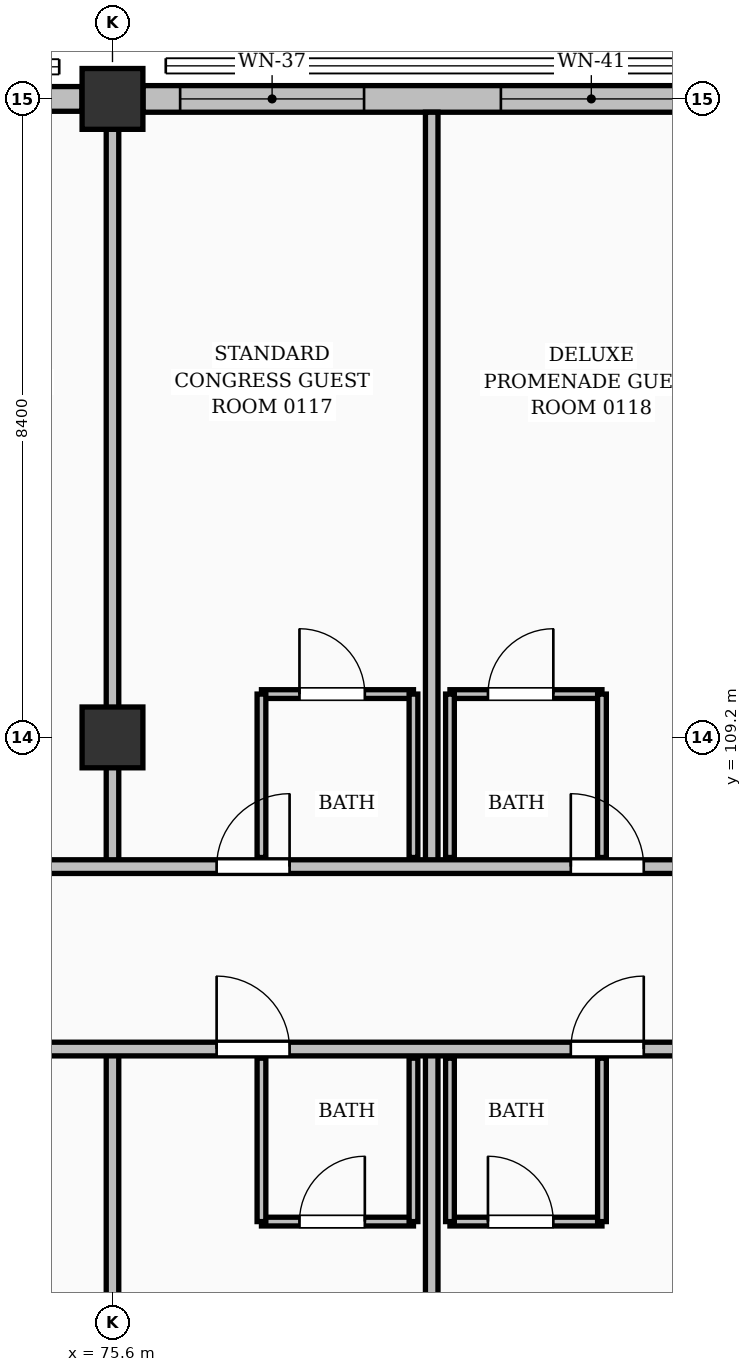
"""IFC4 building model, lengths in metres.
Left out: names, types, materials, properties, quantities, classifications, styles, units other than length and angle.
Written with IfcOpenShell. Run it as: python <this file> out.ifc"""

import sys

from ifc_helpers import new_model, si_unit, direction, frame, frame_2d, origin, origin_2d, place, context, subcontext, project, spatial, rectangle, extrude, element, fill, save


model = new_model("IFC4")
c1 = context("Model", 3, precision=1e-05, world=origin(), true_north=direction((0.0, 1.0)))
c2 = subcontext(c1, "Body", "Model", "MODEL_VIEW")
j1 = project(units=[si_unit("LENGTHUNIT", "METRE"), si_unit("PLANEANGLEUNIT", "RADIAN")], contexts=[c1])
p1 = place(None, origin())
s1 = spatial("IfcSite", under=j1, at=p1, CompositionType="ELEMENT")
p2 = place(p1, origin())
s2 = spatial("IfcBuilding", under=s1, at=p2, CompositionType="ELEMENT")
p3 = place(p2, frame((0.0, 0.0, 3.92)))
s3 = spatial("IfcBuildingStorey", under=s2, at=p3, CompositionType="ELEMENT", Elevation=3.92)
for number, where, z_axis, x_axis in (
    (1, (75.6, 109.2, 0.0), (0.0, 0.0, 1.0), (1.0, 0.0, 0.0)),
    (2, (75.6, 117.6, 0.0), (0.0, 0.0, 1.0), (1.0, 0.0, 0.0)),
):
    element("IfcColumn", number, at=place(p3, frame(where, z_axis=z_axis, x_axis=x_axis)), inside=s3, PredefinedType="COLUMN", context=c2, shape_type="SweptSolid", body=[
        extrude(rectangle(XDim=0.8, YDim=0.8, at=origin_2d()), origin(), (0.0, 0.0, 1.0), 3.64),
    ])
p4 = place(p3, frame((67.601, 117.6, 0.0), z_axis=(0.0, 0.0, 1.0), x_axis=(1.0, 0.0, 0.0)))
e3 = element("IfcWall", 3, at=p4, inside=s3, PredefinedType="SOLIDWALL", context=c2, shape_type="SweptSolid", body=[
    extrude(rectangle(XDim=7.598, YDim=0.325, at=frame_2d((3.799, 0.0))), origin(), (0.0, 0.0, 1.0), 2.445),
])
p5 = place(p4, frame((0.589, 0.0, 0.25)))
e4 = element("IfcOpeningElement", 4, at=p5, cuts=e3, PredefinedType="OPENING", context=c2, shape_type="SweptSolid", body=[
    extrude(rectangle(XDim=2.22, YDim=1.9, at=frame_2d((1.11, 0.95))), frame((0.0, 0.172, 0.0), z_axis=(0.0, -1.0, 0.0), x_axis=(1.0, 0.0, 0.0)), (0.0, 0.0, 1.0), 0.345),
])
p6 = place(p4, frame((4.689, 0.0, 0.25)))
e5 = element("IfcOpeningElement", 5, at=p6, cuts=e3, PredefinedType="OPENING", context=c2, shape_type="SweptSolid", body=[
    extrude(rectangle(XDim=2.42, YDim=1.9, at=frame_2d((1.21, 0.95))), frame((0.0, 0.172, 0.0), z_axis=(0.0, -1.0, 0.0), x_axis=(1.0, 0.0, 0.0)), (0.0, 0.0, 1.0), 0.345),
])
p7 = place(p3, frame((76.001, 117.6, 0.0), z_axis=(0.0, 0.0, 1.0), x_axis=(1.0, 0.0, 0.0)))
e6 = element("IfcWall", 6, at=p7, inside=s3, PredefinedType="SOLIDWALL", context=c2, shape_type="SweptSolid", body=[
    extrude(rectangle(XDim=7.548, YDim=0.35, at=frame_2d((3.774, 0.0))), origin(), (0.0, 0.0, 1.0), 2.445),
])
p8 = place(p7, frame((0.489, 0.0, 0.25)))
e7 = element("IfcOpeningElement", 7, at=p8, cuts=e6, PredefinedType="OPENING", context=c2, shape_type="SweptSolid", body=[
    extrude(rectangle(XDim=2.42, YDim=1.9, at=frame_2d((1.21, 0.95))), frame((0.0, 0.185, 0.0), z_axis=(0.0, -1.0, 0.0), x_axis=(1.0, 0.0, 0.0)), (0.0, 0.0, 1.0), 0.37),
])
p9 = place(p7, frame((4.709, 0.0, 0.25)))
e8 = element("IfcOpeningElement", 8, at=p9, cuts=e6, PredefinedType="OPENING", context=c2, shape_type="SweptSolid", body=[
    extrude(rectangle(XDim=2.38, YDim=2.0, at=frame_2d((1.19, 1.0))), frame((0.0, 0.185, 0.0), z_axis=(0.0, -1.0, 0.0), x_axis=(1.0, 0.0, 0.0)), (0.0, 0.0, 1.0), 0.37),
])
p10 = place(p3, frame((77.56, 109.77, 0.0), z_axis=(0.0, 0.0, 1.0), x_axis=(1.0, 0.0, 0.0)))
e9 = element("IfcWall", 9, at=p10, inside=s3, PredefinedType="PARTITIONING", context=c2, shape_type="SweptSolid", body=[
    extrude(rectangle(XDim=2.0, YDim=0.115, at=frame_2d((1.0, 0.0))), origin(), (0.0, 0.0, 1.0), 3.36),
])
p11 = place(p10, frame((0.5, 0.0, 0.0)))
e10 = element("IfcOpeningElement", 10, at=p11, cuts=e9, PredefinedType="OPENING", context=c2, shape_type="SweptSolid", body=[
    extrude(rectangle(XDim=0.86, YDim=2.05, at=frame_2d((0.43, 1.025))), frame((0.0, 0.067, 0.0), z_axis=(0.0, -1.0, 0.0), x_axis=(1.0, 0.0, 0.0)), (0.0, 0.0, 1.0), 0.135),
])
p12 = place(p3, frame((77.56, 107.62, 0.0), z_axis=(0.0, 0.0, 1.0), x_axis=(0.0, 1.0, 0.0)))
e11 = element("IfcWall", 11, at=p12, inside=s3, PredefinedType="PARTITIONING", context=c2, shape_type="SweptSolid", body=[
    extrude(rectangle(XDim=2.15, YDim=0.115, at=frame_2d((1.075, 0.0))), origin(), (0.0, 0.0, 1.0), 2.882),
])
p13 = place(p3, frame((79.56, 107.62, 0.0), z_axis=(0.0, 0.0, 1.0), x_axis=(0.0, 1.0, 0.0)))
e12 = element("IfcWall", 12, at=p13, inside=s3, PredefinedType="PARTITIONING", context=c2, shape_type="SweptSolid", body=[
    extrude(rectangle(XDim=2.15, YDim=0.115, at=frame_2d((1.075, 0.0))), origin(), (0.0, 0.0, 1.0), 3.36),
])
p14 = place(p3, frame((80.04, 109.77, 0.0), z_axis=(0.0, 0.0, 1.0), x_axis=(1.0, 0.0, 0.0)))
e13 = element("IfcWall", 13, at=p14, inside=s3, PredefinedType="PARTITIONING", context=c2, shape_type="SweptSolid", body=[
    extrude(rectangle(XDim=2.0, YDim=0.115, at=frame_2d((1.0, 0.0))), origin(), (0.0, 0.0, 1.0), 3.36),
])
p15 = place(p14, frame((0.5, 0.0, 0.0)))
e14 = element("IfcOpeningElement", 14, at=p15, cuts=e13, PredefinedType="OPENING", context=c2, shape_type="SweptSolid", body=[
    extrude(rectangle(XDim=0.86, YDim=2.05, at=frame_2d((0.43, 1.025))), frame((0.0, 0.067, 0.0), z_axis=(0.0, -1.0, 0.0), x_axis=(1.0, 0.0, 0.0)), (0.0, 0.0, 1.0), 0.135),
])
p16 = place(p3, frame((80.04, 107.62, 0.0), z_axis=(0.0, 0.0, 1.0), x_axis=(0.0, 1.0, 0.0)))
e15 = element("IfcWall", 15, at=p16, inside=s3, PredefinedType="PARTITIONING", context=c2, shape_type="SweptSolid", body=[
    extrude(rectangle(XDim=2.15, YDim=0.115, at=frame_2d((1.075, 0.0))), origin(), (0.0, 0.0, 1.0), 3.36),
])
p17 = place(p3, frame((82.04, 107.62, 0.0), z_axis=(0.0, 0.0, 1.0), x_axis=(0.0, 1.0, 0.0)))
e16 = element("IfcWall", 16, at=p17, inside=s3, PredefinedType="PARTITIONING", context=c2, shape_type="SweptSolid", body=[
    extrude(rectangle(XDim=2.15, YDim=0.115, at=frame_2d((1.075, 0.0))), origin(), (0.0, 0.0, 1.0), 2.882),
])
p18 = place(p3, frame((79.8, 107.5, 0.0), z_axis=(0.0, 0.0, 1.0), x_axis=(0.0, 1.0, 0.0)))
e17 = element("IfcWall", 17, at=p18, inside=s3, PredefinedType="PARTITIONING", context=c2, shape_type="SweptSolid", body=[
    extrude(rectangle(XDim=9.925, YDim=0.165, at=frame_2d((4.962, 0.0))), origin(), (0.0, 0.0, 1.0), 3.36),
])
p19 = place(p3, frame((75.6, 107.5, 0.0), z_axis=(0.0, 0.0, 1.0), x_axis=(0.0, 1.0, 0.0)))
e18 = element("IfcWall", 18, at=p19, inside=s3, PredefinedType="PARTITIONING", context=c2, shape_type="SweptSolid", body=[
    extrude(rectangle(XDim=9.75, YDim=0.165, at=frame_2d((4.875, 0.0))), origin(), (0.0, 0.0, 1.0), 2.495),
])
p20 = place(p3, frame((40.66, 107.5, 0.0), z_axis=(0.0, 0.0, 1.0), x_axis=(1.0, 0.0, 0.0)))
e19 = element("IfcWall", 19, at=p20, inside=s3, PredefinedType="PARTITIONING", context=c2, shape_type="SweptSolid", body=[
    extrude(rectangle(XDim=43.15, YDim=0.18, at=frame_2d((21.575, 0.0))), origin(), (0.0, 0.0, 1.0), 3.36),
])
p21 = place(p20, frame((0.2, 0.0, 0.0)))
e20 = element("IfcOpeningElement", 20, at=p21, cuts=e19, PredefinedType="OPENING", context=c2, shape_type="SweptSolid", body=[
    extrude(rectangle(XDim=0.94, YDim=2.1, at=frame_2d((0.47, 1.05))), frame((0.0, 0.1, 0.0), z_axis=(0.0, -1.0, 0.0), x_axis=(1.0, 0.0, 0.0)), (0.0, 0.0, 1.0), 0.2),
])
p22 = place(p20, frame((2.71, 0.0, 0.0)))
e21 = element("IfcOpeningElement", 21, at=p22, cuts=e19, PredefinedType="OPENING", context=c2, shape_type="SweptSolid", body=[
    extrude(rectangle(XDim=0.96, YDim=2.15, at=frame_2d((0.48, 1.075))), frame((0.0, 0.1, 0.0), z_axis=(0.0, -1.0, 0.0), x_axis=(1.0, 0.0, 0.0)), (0.0, 0.0, 1.0), 0.2),
])
p23 = place(p20, frame((7.37, 0.0, 0.0)))
e22 = element("IfcOpeningElement", 22, at=p23, cuts=e19, PredefinedType="OPENING", context=c2, shape_type="SweptSolid", body=[
    extrude(rectangle(XDim=0.96, YDim=2.15, at=frame_2d((0.48, 1.075))), frame((0.0, 0.1, 0.0), z_axis=(0.0, -1.0, 0.0), x_axis=(1.0, 0.0, 0.0)), (0.0, 0.0, 1.0), 0.2),
])
p24 = place(p20, frame((11.11, 0.0, 0.0)))
e23 = element("IfcOpeningElement", 23, at=p24, cuts=e19, PredefinedType="OPENING", context=c2, shape_type="SweptSolid", body=[
    extrude(rectangle(XDim=0.96, YDim=2.15, at=frame_2d((0.48, 1.075))), frame((0.0, 0.1, 0.0), z_axis=(0.0, -1.0, 0.0), x_axis=(1.0, 0.0, 0.0)), (0.0, 0.0, 1.0), 0.2),
])
p25 = place(p20, frame((15.77, 0.0, 0.0)))
e24 = element("IfcOpeningElement", 24, at=p25, cuts=e19, PredefinedType="OPENING", context=c2, shape_type="SweptSolid", body=[
    extrude(rectangle(XDim=0.96, YDim=2.15, at=frame_2d((0.48, 1.075))), frame((0.0, 0.1, 0.0), z_axis=(0.0, -1.0, 0.0), x_axis=(1.0, 0.0, 0.0)), (0.0, 0.0, 1.0), 0.2),
])
p26 = place(p20, frame((19.51, 0.0, 0.0)))
e25 = element("IfcOpeningElement", 25, at=p26, cuts=e19, PredefinedType="OPENING", context=c2, shape_type="SweptSolid", body=[
    extrude(rectangle(XDim=0.96, YDim=2.15, at=frame_2d((0.48, 1.075))), frame((0.0, 0.1, 0.0), z_axis=(0.0, -1.0, 0.0), x_axis=(1.0, 0.0, 0.0)), (0.0, 0.0, 1.0), 0.2),
])
p27 = place(p20, frame((24.17, 0.0, 0.0)))
e26 = element("IfcOpeningElement", 26, at=p27, cuts=e19, PredefinedType="OPENING", context=c2, shape_type="SweptSolid", body=[
    extrude(rectangle(XDim=0.96, YDim=2.15, at=frame_2d((0.48, 1.075))), frame((0.0, 0.1, 0.0), z_axis=(0.0, -1.0, 0.0), x_axis=(1.0, 0.0, 0.0)), (0.0, 0.0, 1.0), 0.2),
])
p28 = place(p20, frame((27.91, 0.0, 0.0)))
e27 = element("IfcOpeningElement", 27, at=p28, cuts=e19, PredefinedType="OPENING", context=c2, shape_type="SweptSolid", body=[
    extrude(rectangle(XDim=0.96, YDim=2.15, at=frame_2d((0.48, 1.075))), frame((0.0, 0.1, 0.0), z_axis=(0.0, -1.0, 0.0), x_axis=(1.0, 0.0, 0.0)), (0.0, 0.0, 1.0), 0.2),
])
p29 = place(p20, frame((32.57, 0.0, 0.0)))
e28 = element("IfcOpeningElement", 28, at=p29, cuts=e19, PredefinedType="OPENING", context=c2, shape_type="SweptSolid", body=[
    extrude(rectangle(XDim=0.96, YDim=2.15, at=frame_2d((0.48, 1.075))), frame((0.0, 0.1, 0.0), z_axis=(0.0, -1.0, 0.0), x_axis=(1.0, 0.0, 0.0)), (0.0, 0.0, 1.0), 0.2),
])
p30 = place(p20, frame((36.31, 0.0, 0.0)))
e29 = element("IfcOpeningElement", 29, at=p30, cuts=e19, PredefinedType="OPENING", context=c2, shape_type="SweptSolid", body=[
    extrude(rectangle(XDim=0.96, YDim=2.15, at=frame_2d((0.48, 1.075))), frame((0.0, 0.1, 0.0), z_axis=(0.0, -1.0, 0.0), x_axis=(1.0, 0.0, 0.0)), (0.0, 0.0, 1.0), 0.2),
])
p31 = place(p20, frame((40.97, 0.0, 0.0)))
e30 = element("IfcOpeningElement", 30, at=p31, cuts=e19, PredefinedType="OPENING", context=c2, shape_type="SweptSolid", body=[
    extrude(rectangle(XDim=0.96, YDim=2.15, at=frame_2d((0.48, 1.075))), frame((0.0, 0.1, 0.0), z_axis=(0.0, -1.0, 0.0), x_axis=(1.0, 0.0, 0.0)), (0.0, 0.0, 1.0), 0.2),
])
p32 = place(p3, frame((77.56, 102.83, 0.0), z_axis=(0.0, 0.0, 1.0), x_axis=(1.0, 0.0, 0.0)))
e31 = element("IfcWall", 31, at=p32, inside=s3, PredefinedType="PARTITIONING", context=c2, shape_type="SweptSolid", body=[
    extrude(rectangle(XDim=2.0, YDim=0.115, at=frame_2d((1.0, 0.0))), origin(), (0.0, 0.0, 1.0), 3.36),
])
p33 = place(p32, frame((0.5, 0.0, 0.0)))
e32 = element("IfcOpeningElement", 32, at=p33, cuts=e31, PredefinedType="OPENING", context=c2, shape_type="SweptSolid", body=[
    extrude(rectangle(XDim=0.86, YDim=2.05, at=frame_2d((0.43, 1.025))), frame((0.0, 0.067, 0.0), z_axis=(0.0, -1.0, 0.0), x_axis=(1.0, 0.0, 0.0)), (0.0, 0.0, 1.0), 0.135),
])
for number, where, z_axis, x_axis in (
    (33, (77.56, 102.83, 0.0), (0.0, 0.0, 1.0), (0.0, 1.0, 0.0)),
    (34, (79.56, 102.83, 0.0), (0.0, 0.0, 1.0), (0.0, 1.0, 0.0)),
):
    element("IfcWall", number, at=place(p3, frame(where, z_axis=z_axis, x_axis=x_axis)), inside=s3, PredefinedType="PARTITIONING", context=c2, shape_type="SweptSolid", body=[
        extrude(rectangle(XDim=2.15, YDim=0.115, at=frame_2d((1.075, 0.0))), origin(), (0.0, 0.0, 1.0), 3.36),
    ])
p34 = place(p3, frame((80.04, 102.83, 0.0), z_axis=(0.0, 0.0, 1.0), x_axis=(1.0, 0.0, 0.0)))
e35 = element("IfcWall", 35, at=p34, inside=s3, PredefinedType="PARTITIONING", context=c2, shape_type="SweptSolid", body=[
    extrude(rectangle(XDim=2.0, YDim=0.115, at=frame_2d((1.0, 0.0))), origin(), (0.0, 0.0, 1.0), 3.36),
])
p35 = place(p34, frame((0.5, 0.0, 0.0)))
e36 = element("IfcOpeningElement", 36, at=p35, cuts=e35, PredefinedType="OPENING", context=c2, shape_type="SweptSolid", body=[
    extrude(rectangle(XDim=0.86, YDim=2.05, at=frame_2d((0.43, 1.025))), frame((0.0, 0.067, 0.0), z_axis=(0.0, -1.0, 0.0), x_axis=(1.0, 0.0, 0.0)), (0.0, 0.0, 1.0), 0.135),
])
for number, where, z_axis, x_axis in (
    (37, (80.04, 102.83, 0.0), (0.0, 0.0, 1.0), (0.0, 1.0, 0.0)),
    (38, (82.04, 102.83, 0.0), (0.0, 0.0, 1.0), (0.0, 1.0, 0.0)),
):
    element("IfcWall", number, at=place(p3, frame(where, z_axis=z_axis, x_axis=x_axis)), inside=s3, PredefinedType="PARTITIONING", context=c2, shape_type="SweptSolid", body=[
        extrude(rectangle(XDim=2.15, YDim=0.115, at=frame_2d((1.075, 0.0))), origin(), (0.0, 0.0, 1.0), 3.36),
    ])
p36 = place(p3, frame((79.8, 84.175, 0.0), z_axis=(0.0, 0.0, 1.0), x_axis=(0.0, 1.0, 0.0)))
e39 = element("IfcWall", 39, at=p36, inside=s3, PredefinedType="PARTITIONING", context=c2, shape_type="SweptSolid", body=[
    extrude(rectangle(XDim=20.925, YDim=0.165, at=frame_2d((10.462, 0.0))), origin(), (0.0, 0.0, 1.0), 3.36),
])
p37 = place(p3, frame((75.6, 84.35, 0.0), z_axis=(0.0, 0.0, 1.0), x_axis=(0.0, 1.0, 0.0)))
e40 = element("IfcWall", 40, at=p37, inside=s3, PredefinedType="PARTITIONING", context=c2, shape_type="SweptSolid", body=[
    extrude(rectangle(XDim=20.75, YDim=0.165, at=frame_2d((10.375, 0.0))), origin(), (0.0, 0.0, 1.0), 2.495),
])
p38 = place(p3, frame((54.4, 105.1, 0.0), z_axis=(0.0, 0.0, 1.0), x_axis=(1.0, 0.0, 0.0)))
e41 = element("IfcWall", 41, at=p38, inside=s3, PredefinedType="PARTITIONING", context=c2, shape_type="SweptSolid", body=[
    extrude(rectangle(XDim=29.41, YDim=0.18, at=frame_2d((14.705, 0.0))), origin(), (0.0, 0.0, 1.0), 3.36),
])
p39 = place(p38, frame((2.03, 0.0, 0.0)))
e42 = element("IfcOpeningElement", 42, at=p39, cuts=e41, PredefinedType="OPENING", context=c2, shape_type="SweptSolid", body=[
    extrude(rectangle(XDim=0.96, YDim=2.15, at=frame_2d((0.48, 1.075))), frame((0.0, 0.1, 0.0), z_axis=(0.0, -1.0, 0.0), x_axis=(1.0, 0.0, 0.0)), (0.0, 0.0, 1.0), 0.2),
])
p40 = place(p38, frame((5.77, 0.0, 0.0)))
e43 = element("IfcOpeningElement", 43, at=p40, cuts=e41, PredefinedType="OPENING", context=c2, shape_type="SweptSolid", body=[
    extrude(rectangle(XDim=0.96, YDim=2.15, at=frame_2d((0.48, 1.075))), frame((0.0, 0.1, 0.0), z_axis=(0.0, -1.0, 0.0), x_axis=(1.0, 0.0, 0.0)), (0.0, 0.0, 1.0), 0.2),
])
p41 = place(p38, frame((10.43, 0.0, 0.0)))
e44 = element("IfcOpeningElement", 44, at=p41, cuts=e41, PredefinedType="OPENING", context=c2, shape_type="SweptSolid", body=[
    extrude(rectangle(XDim=0.96, YDim=2.15, at=frame_2d((0.48, 1.075))), frame((0.0, 0.1, 0.0), z_axis=(0.0, -1.0, 0.0), x_axis=(1.0, 0.0, 0.0)), (0.0, 0.0, 1.0), 0.2),
])
p42 = place(p38, frame((14.17, 0.0, 0.0)))
e45 = element("IfcOpeningElement", 45, at=p42, cuts=e41, PredefinedType="OPENING", context=c2, shape_type="SweptSolid", body=[
    extrude(rectangle(XDim=0.96, YDim=2.15, at=frame_2d((0.48, 1.075))), frame((0.0, 0.1, 0.0), z_axis=(0.0, -1.0, 0.0), x_axis=(1.0, 0.0, 0.0)), (0.0, 0.0, 1.0), 0.2),
])
p43 = place(p38, frame((18.83, 0.0, 0.0)))
e46 = element("IfcOpeningElement", 46, at=p43, cuts=e41, PredefinedType="OPENING", context=c2, shape_type="SweptSolid", body=[
    extrude(rectangle(XDim=0.96, YDim=2.15, at=frame_2d((0.48, 1.075))), frame((0.0, 0.1, 0.0), z_axis=(0.0, -1.0, 0.0), x_axis=(1.0, 0.0, 0.0)), (0.0, 0.0, 1.0), 0.2),
])
p44 = place(p38, frame((22.57, 0.0, 0.0)))
e47 = element("IfcOpeningElement", 47, at=p44, cuts=e41, PredefinedType="OPENING", context=c2, shape_type="SweptSolid", body=[
    extrude(rectangle(XDim=0.96, YDim=2.15, at=frame_2d((0.48, 1.075))), frame((0.0, 0.1, 0.0), z_axis=(0.0, -1.0, 0.0), x_axis=(1.0, 0.0, 0.0)), (0.0, 0.0, 1.0), 0.2),
])
p45 = place(p38, frame((27.23, 0.0, 0.0)))
e48 = element("IfcOpeningElement", 48, at=p45, cuts=e41, PredefinedType="OPENING", context=c2, shape_type="SweptSolid", body=[
    extrude(rectangle(XDim=0.96, YDim=2.15, at=frame_2d((0.48, 1.075))), frame((0.0, 0.1, 0.0), z_axis=(0.0, -1.0, 0.0), x_axis=(1.0, 0.0, 0.0)), (0.0, 0.0, 1.0), 0.2),
])
p46 = place(p8, origin())
e49 = element("IfcWindow", 49, at=p46, inside=s3, PartitioningType="DOUBLE_PANEL_VERTICAL", PredefinedType="WINDOW", context=c2, shape_type="SweptSolid", body=[
    extrude(rectangle(XDim=2.42, YDim=1.9, at=frame_2d((1.21, 0.95))), frame((0.0, 0.03, 0.0), z_axis=(0.0, -1.0, 0.0), x_axis=(1.0, 0.0, 0.0)), (0.0, 0.0, 1.0), 0.06),
])
fill(e7, e49)
p47 = place(p9, origin())
e50 = element("IfcWindow", 50, at=p47, inside=s3, PartitioningType="DOUBLE_PANEL_VERTICAL", PredefinedType="WINDOW", context=c2, shape_type="SweptSolid", body=[
    extrude(rectangle(XDim=2.38, YDim=2.0, at=frame_2d((1.19, 1.0))), frame((0.0, 0.03, 0.0), z_axis=(0.0, -1.0, 0.0), x_axis=(1.0, 0.0, 0.0)), (0.0, 0.0, 1.0), 0.06),
])
fill(e8, e50)
p48 = place(p11, origin())
e51 = element("IfcDoor", 51, at=p48, inside=s3, OperationType="SINGLE_SWING_LEFT", PredefinedType="DOOR", context=c2, shape_type="SweptSolid", body=[
    extrude(rectangle(XDim=0.86, YDim=2.05, at=frame_2d((0.43, 1.025))), frame((0.0, 0.025, 0.0), z_axis=(0.0, -1.0, 0.0), x_axis=(1.0, 0.0, 0.0)), (0.0, 0.0, 1.0), 0.05),
])
fill(e10, e51)
p49 = place(p15, origin())
e52 = element("IfcDoor", 52, at=p49, inside=s3, OperationType="SINGLE_SWING_RIGHT", PredefinedType="DOOR", context=c2, shape_type="SweptSolid", body=[
    extrude(rectangle(XDim=0.86, YDim=2.05, at=frame_2d((0.43, 1.025))), frame((0.0, 0.025, 0.0), z_axis=(0.0, -1.0, 0.0), x_axis=(1.0, 0.0, 0.0)), (0.0, 0.0, 1.0), 0.05),
])
fill(e14, e52)
p50 = place(p30, origin())
e53 = element("IfcDoor", 53, at=p50, inside=s3, OperationType="SINGLE_SWING_RIGHT", PredefinedType="DOOR", context=c2, shape_type="SweptSolid", body=[
    extrude(rectangle(XDim=0.96, YDim=2.15, at=frame_2d((0.48, 1.075))), frame((0.0, 0.025, 0.0), z_axis=(0.0, -1.0, 0.0), x_axis=(1.0, 0.0, 0.0)), (0.0, 0.0, 1.0), 0.05),
])
fill(e29, e53)
p51 = place(p31, origin())
e54 = element("IfcDoor", 54, at=p51, inside=s3, OperationType="SINGLE_SWING_LEFT", PredefinedType="DOOR", context=c2, shape_type="SweptSolid", body=[
    extrude(rectangle(XDim=0.96, YDim=2.15, at=frame_2d((0.48, 1.075))), frame((0.0, 0.025, 0.0), z_axis=(0.0, -1.0, 0.0), x_axis=(1.0, 0.0, 0.0)), (0.0, 0.0, 1.0), 0.05),
])
fill(e30, e54)
p52 = place(p33, origin())
e55 = element("IfcDoor", 55, at=p52, inside=s3, OperationType="SINGLE_SWING_RIGHT", PredefinedType="DOOR", context=c2, shape_type="SweptSolid", body=[
    extrude(rectangle(XDim=0.86, YDim=2.05, at=frame_2d((0.43, 1.025))), frame((0.0, 0.025, 0.0), z_axis=(0.0, -1.0, 0.0), x_axis=(1.0, 0.0, 0.0)), (0.0, 0.0, 1.0), 0.05),
])
fill(e32, e55)
p53 = place(p35, origin())
e56 = element("IfcDoor", 56, at=p53, inside=s3, OperationType="SINGLE_SWING_LEFT", PredefinedType="DOOR", context=c2, shape_type="SweptSolid", body=[
    extrude(rectangle(XDim=0.86, YDim=2.05, at=frame_2d((0.43, 1.025))), frame((0.0, 0.025, 0.0), z_axis=(0.0, -1.0, 0.0), x_axis=(1.0, 0.0, 0.0)), (0.0, 0.0, 1.0), 0.05),
])
fill(e36, e56)
p54 = place(p44, origin())
e57 = element("IfcDoor", 57, at=p54, inside=s3, OperationType="SINGLE_SWING_LEFT", PredefinedType="DOOR", context=c2, shape_type="SweptSolid", body=[
    extrude(rectangle(XDim=0.96, YDim=2.15, at=frame_2d((0.48, 1.075))), frame((0.0, 0.025, 0.0), z_axis=(0.0, -1.0, 0.0), x_axis=(1.0, 0.0, 0.0)), (0.0, 0.0, 1.0), 0.05),
])
fill(e47, e57)
p55 = place(p45, origin())
e58 = element("IfcDoor", 58, at=p55, inside=s3, OperationType="SINGLE_SWING_RIGHT", PredefinedType="DOOR", context=c2, shape_type="SweptSolid", body=[
    extrude(rectangle(XDim=0.96, YDim=2.15, at=frame_2d((0.48, 1.075))), frame((0.0, 0.025, 0.0), z_axis=(0.0, -1.0, 0.0), x_axis=(1.0, 0.0, 0.0)), (0.0, 0.0, 1.0), 0.05),
])
fill(e48, e58)
save(model, sys.argv[1])
